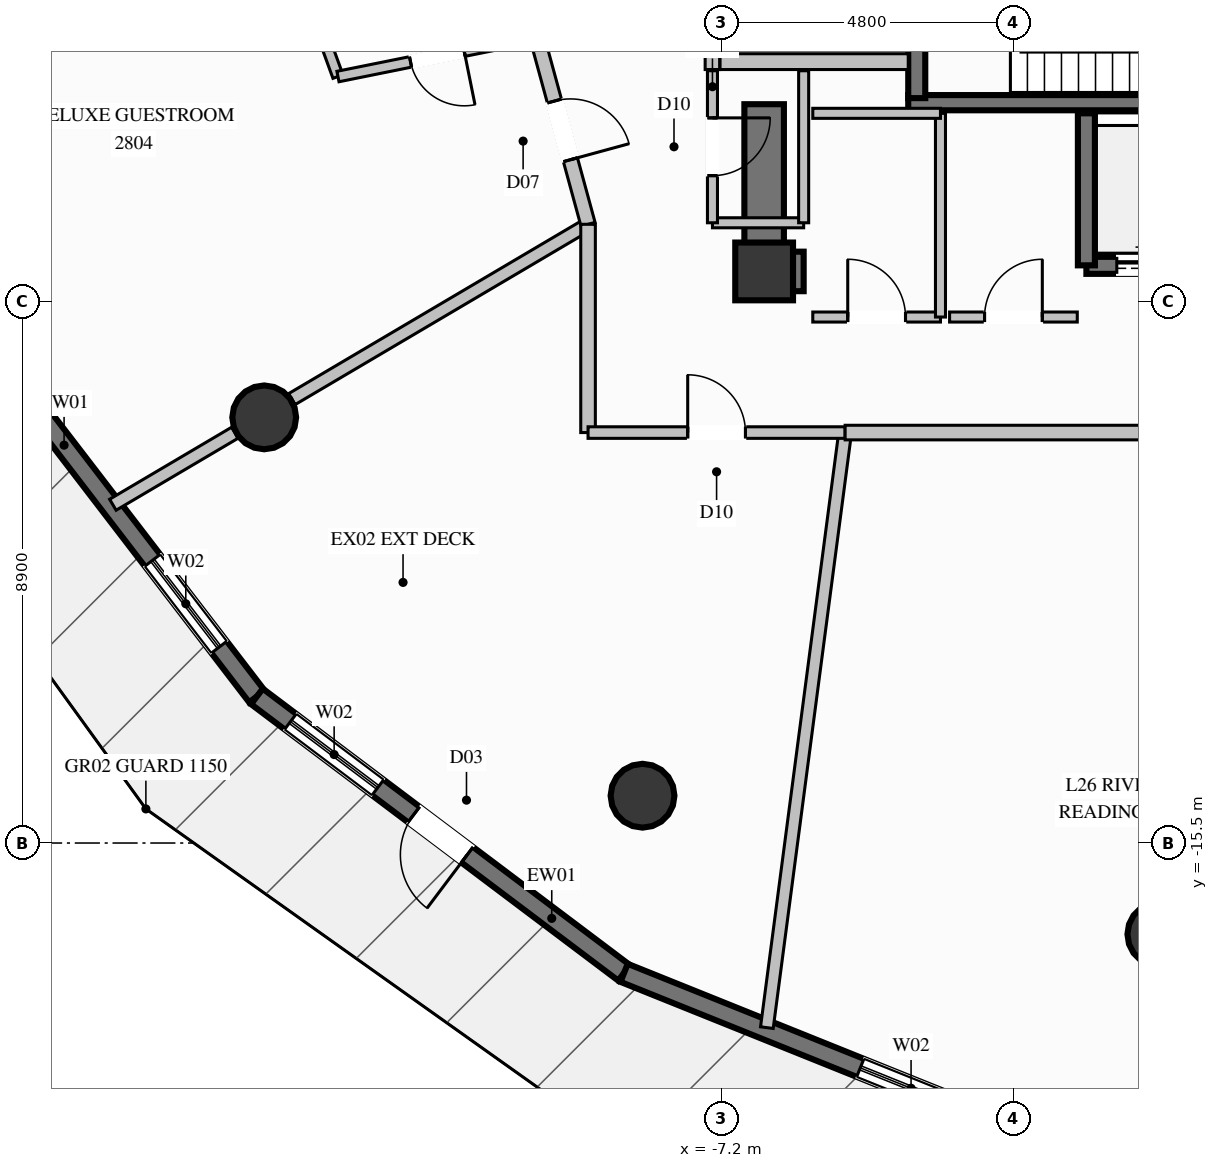
"""IFC4 building model, lengths in metres.
Left out: names, types, materials, properties, quantities, classifications, styles, units other than length and angle.
Written with IfcOpenShell. Run it as: python <this file> out.ifc"""

import sys

from ifc_helpers import new_model, si_unit, direction, frame, frame_2d, origin, origin_2d, place, context, subcontext, project, spatial, rectangle, circle, extrude, element, fill, save


model = new_model("IFC4")
c1 = context("Model", 3, precision=1e-05, world=origin(), true_north=direction((0.0, 1.0)))
c2 = subcontext(c1, "Body", "Model", "MODEL_VIEW")
j1 = project(units=[si_unit("LENGTHUNIT", "METRE"), si_unit("PLANEANGLEUNIT", "RADIAN")], contexts=[c1])
p1 = place(None, origin())
s1 = spatial("IfcSite", under=j1, at=p1, CompositionType="ELEMENT")
p2 = place(p1, origin())
s2 = spatial("IfcBuilding", under=s1, at=p2, CompositionType="ELEMENT")
p3 = place(p2, frame((0.0, 0.0, 106.2)))
s3 = spatial("IfcBuildingStorey", under=s2, at=p3, CompositionType="ELEMENT", Elevation=106.2)
p4 = place(p3, frame((-6.5, -6.1, 0.0), z_axis=(0.0, 0.0, 1.0), x_axis=(1.0, 0.0, 0.0)))
e1 = element("IfcColumn", 1, at=p4, inside=s3, PredefinedType="COLUMN", context=c2, shape_type="SweptSolid", body=[
    extrude(rectangle(XDim=0.95, YDim=0.95, at=origin_2d()), origin(), (0.0, 0.0, 1.0), 3.6),
])
p5 = place(p3, frame((-4.13, -3.325, 0.0), z_axis=(0.0, 0.0, 1.0), x_axis=(1.0, 0.0, 0.0)))
e2 = element("IfcWall", 2, at=p5, inside=s3, PredefinedType="SOLIDWALL", context=c2, shape_type="SweptSolid", body=[
    extrude(rectangle(XDim=8.26, YDim=0.25, at=frame_2d((4.13, 0.0))), origin(), (0.0, 0.0, 1.0), 3.6),
])
p6 = place(p3, frame((-6.175, -6.1, 0.0), z_axis=(0.0, 0.0, 1.0), x_axis=(1.0, 0.0, 0.0)))
e3 = element("IfcWall", 3, at=p6, inside=s3, PredefinedType="SHEAR", context=c2, shape_type="SweptSolid", body=[
    extrude(rectangle(XDim=0.325, YDim=0.65, at=frame_2d((0.163, 0.0))), origin(), (0.0, 0.0, 1.0), 3.6),
])
p7 = place(p3, frame((-6.5, -6.425, 0.0), z_axis=(0.0, 0.0, 1.0), x_axis=(0.0, 1.0, 0.0)))
e4 = element("IfcWall", 4, at=p7, inside=s3, PredefinedType="SHEAR", context=c2, shape_type="SweptSolid", body=[
    extrude(rectangle(XDim=3.075, YDim=0.65, at=frame_2d((1.538, 0.0))), origin(), (0.0, 0.0, 1.0), 3.6),
])
for number, where, z_axis, x_axis in (
    (5, (-14.722, -8.5, 0.0), (0.0, 0.0, 1.0), (1.0, 0.0, 0.0)),
    (6, (-8.5, -14.722, 0.0), (0.0, 0.0, 1.0), (1.0, 0.0, 0.0)),
    (7, (0.0, -17.0, 0.0), (0.0, 0.0, 1.0), (1.0, 0.0, 0.0)),
):
    element("IfcColumn", number, at=place(p3, frame(where, z_axis=z_axis, x_axis=x_axis)), inside=s3, PredefinedType="COLUMN", context=c2, shape_type="SweptSolid", body=[
        extrude(circle(Radius=0.525, at=origin_2d()), origin(), (0.0, 0.0, 1.0), 3.6),
    ])
p8 = place(p3, frame((-14.842, -13.089, 0.0), z_axis=(0.0, 0.0, 1.0), x_axis=(-0.608831916989, 0.793299247986, 0.0)))
e8 = element("IfcWall", 8, at=p8, inside=s3, PredefinedType="SOLIDWALL", context=c2, shape_type="SweptSolid", body=[
    extrude(rectangle(XDim=7.347, YDim=0.32, at=frame_2d((3.673, 0.0))), origin(), (0.0, 0.0, 1.0), 3.35),
])
p9 = place(p8, frame((1.021, 0.0, 0.35)))
e9 = element("IfcOpeningElement", 9, at=p9, cuts=e8, PredefinedType="OPENING", context=c2, shape_type="SweptSolid", body=[
    extrude(rectangle(XDim=1.8, YDim=2.6, at=frame_2d((0.9, 1.3))), frame((0.0, 0.17, 0.0), z_axis=(0.0, -1.0, 0.0), x_axis=(1.0, 0.0, 0.0)), (0.0, 0.0, 1.0), 0.34),
])
p10 = place(p3, frame((-8.803, -17.635, 0.0), z_axis=(0.0, 0.0, 1.0), x_axis=(-0.798944530401, 0.601404720087, 0.0)))
e10 = element("IfcWall", 10, at=p10, inside=s3, PredefinedType="SOLIDWALL", context=c2, shape_type="SweptSolid", body=[
    extrude(rectangle(XDim=7.559, YDim=0.32, at=frame_2d((3.779, 0.0))), origin(), (0.0, 0.0, 1.0), 3.35),
])
p11 = place(p10, frame((5.069, 0.0, 0.35)))
e11 = element("IfcOpeningElement", 11, at=p11, cuts=e10, PredefinedType="OPENING", context=c2, shape_type="SweptSolid", body=[
    extrude(rectangle(XDim=1.8, YDim=2.6, at=frame_2d((0.9, 1.3))), frame((0.0, 0.17, 0.0), z_axis=(0.0, -1.0, 0.0), x_axis=(1.0, 0.0, 0.0)), (0.0, 0.0, 1.0), 0.34),
])
p12 = place(p10, frame((3.229, 0.0, 0.0)))
e12 = element("IfcOpeningElement", 12, at=p12, cuts=e10, PredefinedType="OPENING", context=c2, shape_type="SweptSolid", body=[
    extrude(rectangle(XDim=1.1, YDim=2.2, at=frame_2d((0.55, 1.1))), frame((0.0, 0.17, 0.0), z_axis=(0.0, -1.0, 0.0), x_axis=(1.0, 0.0, 0.0)), (0.0, 0.0, 1.0), 0.34),
])
p13 = place(p3, frame((-1.79, -20.455, 0.0), z_axis=(0.0, 0.0, 1.0), x_axis=(-0.927795739468, 0.373088549577, 0.0)))
e13 = element("IfcWall", 13, at=p13, inside=s3, PredefinedType="SOLIDWALL", context=c2, shape_type="SweptSolid", body=[
    extrude(rectangle(XDim=7.559, YDim=0.32, at=frame_2d((3.779, 0.0))), origin(), (0.0, 0.0, 1.0), 3.35),
])
p14 = place(p13, frame((1.572, 0.0, 0.35)))
e14 = element("IfcOpeningElement", 14, at=p14, cuts=e13, PredefinedType="OPENING", context=c2, shape_type="SweptSolid", body=[
    extrude(rectangle(XDim=1.8, YDim=2.6, at=frame_2d((0.9, 1.3))), frame((0.0, 0.17, 0.0), z_axis=(0.0, -1.0, 0.0), x_axis=(1.0, 0.0, 0.0)), (0.0, 0.0, 1.0), 0.34),
])
p15 = place(p3, frame((-1.2, -6.0, 0.0), z_axis=(0.0, 0.0, 1.0), x_axis=(1.0, 0.0, 0.0)))
e15 = element("IfcWall", 15, at=p15, inside=s3, PredefinedType="SOLIDWALL", context=c2, shape_type="SweptSolid", body=[
    extrude(rectangle(XDim=2.1, YDim=0.28, at=frame_2d((1.05, 0.0))), origin(), (0.0, 0.0, 1.0), 3.35),
])
p16 = place(p15, frame((0.5, 0.0, 0.0)))
e16 = element("IfcOpeningElement", 16, at=p16, cuts=e15, PredefinedType="OPENING", context=c2, shape_type="SweptSolid", body=[
    extrude(rectangle(XDim=1.1, YDim=2.2, at=frame_2d((0.55, 1.1))), frame((0.0, 0.15, 0.0), z_axis=(0.0, -1.0, 0.0), x_axis=(1.0, 0.0, 0.0)), (0.0, 0.0, 1.0), 0.3),
])
p17 = place(p3, frame((-1.2, -3.5, 0.0), z_axis=(0.0, 0.0, 1.0), x_axis=(0.0, -1.0, 0.0)))
e17 = element("IfcWall", 17, at=p17, inside=s3, PredefinedType="SOLIDWALL", context=c2, shape_type="SweptSolid", body=[
    extrude(rectangle(XDim=2.5, YDim=0.28, at=frame_2d((1.25, 0.0))), origin(), (0.0, 0.0, 1.0), 3.35),
])
p18 = place(p3, frame((-3.99, -3.25, 0.0), z_axis=(0.0, 0.0, 1.0), x_axis=(0.0, 1.0, 0.0)))
e18 = element("IfcWall", 18, at=p18, inside=s3, PredefinedType="SOLIDWALL", context=c2, shape_type="SweptSolid", body=[
    extrude(rectangle(XDim=5.46, YDim=0.28, at=frame_2d((2.73, 0.0))), origin(), (0.0, 0.0, 1.0), 3.35),
])
p19 = place(p18, frame((0.937, 0.0, 0.0)))
e19 = element("IfcOpeningElement", 19, at=p19, cuts=e18, PredefinedType="OPENING", context=c2, shape_type="SweptSolid", body=[
    extrude(rectangle(XDim=1.2, YDim=2.2, at=frame_2d((0.6, 1.1))), frame((0.0, 0.15, 0.0), z_axis=(0.0, -1.0, 0.0), x_axis=(1.0, 0.0, 0.0)), (0.0, 0.0, 1.0), 0.3),
])
p20 = place(p3, frame((-7.35, -2.78, 0.0), z_axis=(0.0, 0.0, 1.0), x_axis=(0.0, 1.0, 0.0)))
e20 = element("IfcWall", 20, at=p20, inside=s3, PredefinedType="PARTITIONING", context=c2, shape_type="SweptSolid", body=[
    extrude(rectangle(XDim=5.12, YDim=0.24, at=frame_2d((2.56, 0.0))), origin(), (0.0, 0.0, 1.0), 2.435),
])
p21 = place(p20, frame((1.389, 0.0, 0.0)))
e21 = element("IfcOpeningElement", 21, at=p21, cuts=e20, PredefinedType="OPENING", context=c2, shape_type="SweptSolid", body=[
    extrude(rectangle(XDim=1.15, YDim=2.2, at=frame_2d((0.575, 1.1))), frame((0.0, 0.13, 0.0), z_axis=(0.0, -1.0, 0.0), x_axis=(1.0, 0.0, 0.0)), (0.0, 0.0, 1.0), 0.26),
])
p22 = place(p3, frame((-7.225, -2.65, 0.0), z_axis=(0.0, 0.0, 1.0), x_axis=(1.0, 0.0, 0.0)))
e22 = element("IfcWall", 22, at=p22, inside=s3, PredefinedType="PARTITIONING", context=c2, shape_type="SweptSolid", body=[
    extrude(rectangle(XDim=3.095, YDim=0.26, at=frame_2d((1.548, 0.0))), origin(), (0.0, 0.0, 1.0), 3.35),
])
p23 = place(p3, frame((-7.35, -5.3, 0.0), z_axis=(0.0, 0.0, 1.0), x_axis=(1.0, 0.0, 0.0)))
e23 = element("IfcWall", 23, at=p23, inside=s3, PredefinedType="PARTITIONING", context=c2, shape_type="SweptSolid", body=[
    extrude(rectangle(XDim=1.5, YDim=0.165, at=frame_2d((0.75, 0.0))), origin(), (0.0, 0.0, 1.0), 2.435),
])
p24 = place(p3, frame((-5.85, -5.3, 0.0), z_axis=(0.0, 0.0, 1.0), x_axis=(0.0, 1.0, 0.0)))
e24 = element("IfcWall", 24, at=p24, inside=s3, PredefinedType="PARTITIONING", context=c2, shape_type="SweptSolid", body=[
    extrude(rectangle(XDim=2.5, YDim=0.165, at=frame_2d((1.25, 0.0))), origin(), (0.0, 0.0, 1.0), 2.435),
])
p25 = place(p3, frame((-7.35, -2.8, 0.0), z_axis=(0.0, 0.0, 1.0), x_axis=(0.0, -1.0, 0.0)))
e25 = element("IfcWall", 25, at=p25, inside=s3, PredefinedType="PARTITIONING", context=c2, shape_type="SweptSolid", body=[
    extrude(rectangle(XDim=2.5, YDim=0.165, at=frame_2d((1.25, 0.0))), origin(), (0.0, 0.0, 1.0), 3.35),
])
p26 = place(p25, frame((0.775, 0.0, 0.0)))
e26 = element("IfcOpeningElement", 26, at=p26, cuts=e25, PredefinedType="OPENING", context=c2, shape_type="SweptSolid", body=[
    extrude(rectangle(XDim=0.95, YDim=2.1, at=frame_2d((0.475, 1.05))), frame((0.0, 0.093, 0.0), z_axis=(0.0, -1.0, 0.0), x_axis=(1.0, 0.0, 0.0)), (0.0, 0.0, 1.0), 0.185),
])
p27 = place(p3, frame((-5.7, -6.85, 0.0), z_axis=(0.0, 0.0, 1.0), x_axis=(1.0, 0.0, 0.0)))
e27 = element("IfcWall", 27, at=p27, inside=s3, PredefinedType="PARTITIONING", context=c2, shape_type="SweptSolid", body=[
    extrude(rectangle(XDim=2.1, YDim=0.165, at=frame_2d((1.05, 0.0))), origin(), (0.0, 0.0, 1.0), 2.435),
])
p28 = place(p27, frame((0.575, 0.0, 0.0)))
e28 = element("IfcOpeningElement", 28, at=p28, cuts=e27, PredefinedType="OPENING", context=c2, shape_type="SweptSolid", body=[
    extrude(rectangle(XDim=0.95, YDim=2.1, at=frame_2d((0.475, 1.05))), frame((0.0, 0.093, 0.0), z_axis=(0.0, -1.0, 0.0), x_axis=(1.0, 0.0, 0.0)), (0.0, 0.0, 1.0), 0.185),
])
p29 = place(p3, frame((-3.6, -6.85, 0.0), z_axis=(0.0, 0.0, 1.0), x_axis=(0.0, 1.0, 0.0)))
e29 = element("IfcWall", 29, at=p29, inside=s3, PredefinedType="PARTITIONING", context=c2, shape_type="SweptSolid", body=[
    extrude(rectangle(XDim=3.35, YDim=0.165, at=frame_2d((1.675, 0.0))), origin(), (0.0, 0.0, 1.0), 3.35),
])
p30 = place(p3, frame((-3.6, -3.5, 0.0), z_axis=(0.0, 0.0, 1.0), x_axis=(-1.0, 0.0, 0.0)))
e30 = element("IfcWall", 30, at=p30, inside=s3, PredefinedType="PARTITIONING", context=c2, shape_type="SweptSolid", body=[
    extrude(rectangle(XDim=2.1, YDim=0.165, at=frame_2d((1.05, 0.0))), origin(), (0.0, 0.0, 1.0), 3.35),
])
p31 = place(p3, frame((-3.45, -6.85, 0.0), z_axis=(0.0, 0.0, 1.0), x_axis=(1.0, 0.0, 0.0)))
e31 = element("IfcWall", 31, at=p31, inside=s3, PredefinedType="PARTITIONING", context=c2, shape_type="SweptSolid", body=[
    extrude(rectangle(XDim=2.1, YDim=0.165, at=frame_2d((1.05, 0.0))), origin(), (0.0, 0.0, 1.0), 2.435),
])
p32 = place(p31, frame((0.575, 0.0, 0.0)))
e32 = element("IfcOpeningElement", 32, at=p32, cuts=e31, PredefinedType="OPENING", context=c2, shape_type="SweptSolid", body=[
    extrude(rectangle(XDim=0.95, YDim=2.1, at=frame_2d((0.475, 1.05))), frame((0.0, 0.093, 0.0), z_axis=(0.0, -1.0, 0.0), x_axis=(1.0, 0.0, 0.0)), (0.0, 0.0, 1.0), 0.185),
])
p33 = place(p3, frame((-9.396, -5.325, 0.0), z_axis=(0.0, 0.0, 1.0), x_axis=(-0.861187639937, -0.508287171607, 0.0)))
e33 = element("IfcWall", 33, at=p33, inside=s3, PredefinedType="PARTITIONING", context=c2, shape_type="SweptSolid", body=[
    extrude(rectangle(XDim=5.656, YDim=0.21, at=frame_2d((2.828, 0.0))), origin(), (0.0, 0.0, 1.0), 2.719),
])
p34 = place(p3, frame((-15.205, -8.753, 0.0), z_axis=(0.0, 0.0, 1.0), x_axis=(-0.861151801863, -0.508347886932, 0.0)))
e34 = element("IfcWall", 34, at=p34, inside=s3, PredefinedType="PARTITIONING", context=c2, shape_type="SweptSolid", body=[
    extrude(rectangle(XDim=2.329, YDim=0.21, at=frame_2d((1.165, 0.0))), origin(), (0.0, 0.0, 1.0), 3.35),
])
p35 = place(p3, frame((-14.563, 0.0, 0.0), z_axis=(0.0, 0.0, 1.0), x_axis=(0.342092982083, -0.939666106449, 0.0)))
e35 = element("IfcWall", 35, at=p35, inside=s3, PredefinedType="PLUMBINGWALL", context=c2, shape_type="SweptSolid", body=[
    extrude(rectangle(XDim=3.081, YDim=0.175, at=frame_2d((1.541, 0.0))), origin(), (0.0, 0.0, 1.0), 3.35),
])
p36 = place(p3, frame((-10.239, -2.236, 0.0), z_axis=(0.0, 0.0, 1.0), x_axis=(-0.980295333609, -0.197537487338, 0.0)))
e36 = element("IfcWall", 36, at=p36, inside=s3, PredefinedType="PLUMBINGWALL", context=c2, shape_type="SweptSolid", body=[
    extrude(rectangle(XDim=3.336, YDim=0.175, at=frame_2d((1.668, 0.0))), origin(), (0.0, 0.0, 1.0), 3.35),
])
p37 = place(p36, frame((1.218, 0.0, 0.0)))
e37 = element("IfcOpeningElement", 37, at=p37, cuts=e36, PredefinedType="OPENING", context=c2, shape_type="SweptSolid", body=[
    extrude(rectangle(XDim=0.9, YDim=2.1, at=frame_2d((0.45, 1.05))), frame((0.0, 0.098, 0.0), z_axis=(0.0, -1.0, 0.0), x_axis=(1.0, 0.0, 0.0)), (0.0, 0.0, 1.0), 0.195),
])
p38 = place(p3, frame((-10.239, -2.236, 0.0), z_axis=(0.0, 0.0, 1.0), x_axis=(0.26329160366, -0.964716295831, 0.0)))
e38 = element("IfcWall", 38, at=p38, inside=s3, PredefinedType="PARTITIONING", context=c2, shape_type="SweptSolid", body=[
    extrude(rectangle(XDim=3.202, YDim=0.24, at=frame_2d((1.601, 0.0))), origin(), (0.0, 0.0, 1.0), 3.35),
])
p39 = place(p38, frame((1.101, 0.0, 0.0)))
e39 = element("IfcOpeningElement", 39, at=p39, cuts=e38, PredefinedType="OPENING", context=c2, shape_type="SweptSolid", body=[
    extrude(rectangle(XDim=1.0, YDim=2.2, at=frame_2d((0.5, 1.1))), frame((0.0, 0.13, 0.0), z_axis=(0.0, -1.0, 0.0), x_axis=(1.0, 0.0, 0.0)), (0.0, 0.0, 1.0), 0.26),
])
p40 = place(p3, frame((-5.168, -8.75, 0.0), z_axis=(0.0, 0.0, 1.0), x_axis=(-0.130403964366, -0.991460945311, 0.0)))
e40 = element("IfcWall", 40, at=p40, inside=s3, PredefinedType="PARTITIONING", context=c2, shape_type="SweptSolid", body=[
    extrude(rectangle(XDim=9.87, YDim=0.21, at=frame_2d((4.935, 0.0))), origin(), (0.0, 0.0, 1.0), 3.35),
])
p41 = place(p3, frame((-9.396, -5.325, 0.0), z_axis=(0.0, 0.0, 1.0), x_axis=(0.0, -1.0, 0.0)))
e41 = element("IfcWall", 41, at=p41, inside=s3, PredefinedType="PARTITIONING", context=c2, shape_type="SweptSolid", body=[
    extrude(rectangle(XDim=3.425, YDim=0.24, at=frame_2d((1.712, 0.0))), origin(), (0.0, 0.0, 1.0), 3.35),
])
p42 = place(p3, frame((-9.396, -8.75, 0.0), z_axis=(0.0, 0.0, 1.0), x_axis=(1.0, 0.0, 0.0)))
e42 = element("IfcWall", 42, at=p42, inside=s3, PredefinedType="PARTITIONING", context=c2, shape_type="SweptSolid", body=[
    extrude(rectangle(XDim=4.228, YDim=0.19, at=frame_2d((2.114, 0.0))), origin(), (0.0, 0.0, 1.0), 3.35),
])
p43 = place(p42, frame((1.639, 0.0, 0.0)))
e43 = element("IfcOpeningElement", 43, at=p43, cuts=e42, PredefinedType="OPENING", context=c2, shape_type="SweptSolid", body=[
    extrude(rectangle(XDim=0.95, YDim=2.1, at=frame_2d((0.475, 1.05))), frame((0.0, 0.105, 0.0), z_axis=(0.0, -1.0, 0.0), x_axis=(1.0, 0.0, 0.0)), (0.0, 0.0, 1.0), 0.21),
])
p44 = place(p3, frame((-5.168, -8.75, 0.0), z_axis=(0.0, 0.0, 1.0), x_axis=(1.0, 0.0, 0.0)))
e44 = element("IfcWall", 44, at=p44, inside=s3, PredefinedType="PARTITIONING", context=c2, shape_type="SweptSolid", body=[
    extrude(rectangle(XDim=5.168, YDim=0.24, at=frame_2d((2.584, 0.0))), origin(), (0.0, 0.0, 1.0), 3.35),
])
p45 = place(p9, origin())
e45 = element("IfcWindow", 45, at=p45, inside=s3, PartitioningType="SINGLE_PANEL", PredefinedType="WINDOW", context=c2, shape_type="SweptSolid", body=[
    extrude(rectangle(XDim=1.8, YDim=2.6, at=frame_2d((0.9, 1.3))), frame((0.0, 0.03, 0.0), z_axis=(0.0, -1.0, 0.0), x_axis=(1.0, 0.0, 0.0)), (0.0, 0.0, 1.0), 0.06),
])
fill(e9, e45)
p46 = place(p11, origin())
e46 = element("IfcWindow", 46, at=p46, inside=s3, PartitioningType="SINGLE_PANEL", PredefinedType="WINDOW", context=c2, shape_type="SweptSolid", body=[
    extrude(rectangle(XDim=1.8, YDim=2.6, at=frame_2d((0.9, 1.3))), frame((0.0, 0.03, 0.0), z_axis=(0.0, -1.0, 0.0), x_axis=(1.0, 0.0, 0.0)), (0.0, 0.0, 1.0), 0.06),
])
fill(e11, e46)
p47 = place(p12, origin())
e47 = element("IfcDoor", 47, at=p47, inside=s3, OperationType="SINGLE_SWING_LEFT", PredefinedType="DOOR", context=c2, shape_type="SweptSolid", body=[
    extrude(rectangle(XDim=1.1, YDim=2.2, at=frame_2d((0.55, 1.1))), frame((0.0, 0.025, 0.0), z_axis=(0.0, -1.0, 0.0), x_axis=(1.0, 0.0, 0.0)), (0.0, 0.0, 1.0), 0.05),
])
fill(e12, e47)
p48 = place(p14, origin())
e48 = element("IfcWindow", 48, at=p48, inside=s3, PartitioningType="SINGLE_PANEL", PredefinedType="WINDOW", context=c2, shape_type="SweptSolid", body=[
    extrude(rectangle(XDim=1.8, YDim=2.6, at=frame_2d((0.9, 1.3))), frame((0.0, 0.03, 0.0), z_axis=(0.0, -1.0, 0.0), x_axis=(1.0, 0.0, 0.0)), (0.0, 0.0, 1.0), 0.06),
])
fill(e14, e48)
p49 = place(p16, origin())
e49 = element("IfcDoor", 49, at=p49, inside=s3, OperationType="SLIDING_TO_LEFT", PredefinedType="DOOR", context=c2, shape_type="SweptSolid", body=[
    extrude(rectangle(XDim=1.1, YDim=2.2, at=frame_2d((0.55, 1.1))), frame((0.0, 0.025, 0.0), z_axis=(0.0, -1.0, 0.0), x_axis=(1.0, 0.0, 0.0)), (0.0, 0.0, 1.0), 0.05),
])
fill(e16, e49)
p50 = place(p26, origin())
e50 = element("IfcDoor", 50, at=p50, inside=s3, OperationType="SINGLE_SWING_LEFT", PredefinedType="DOOR", context=c2, shape_type="SweptSolid", body=[
    extrude(rectangle(XDim=0.95, YDim=2.1, at=frame_2d((0.475, 1.05))), frame((0.0, 0.025, 0.0), z_axis=(0.0, -1.0, 0.0), x_axis=(1.0, 0.0, 0.0)), (0.0, 0.0, 1.0), 0.05),
])
fill(e26, e50)
p51 = place(p28, origin())
e51 = element("IfcDoor", 51, at=p51, inside=s3, OperationType="SINGLE_SWING_LEFT", PredefinedType="DOOR", context=c2, shape_type="SweptSolid", body=[
    extrude(rectangle(XDim=0.95, YDim=2.1, at=frame_2d((0.475, 1.05))), frame((0.0, 0.025, 0.0), z_axis=(0.0, -1.0, 0.0), x_axis=(1.0, 0.0, 0.0)), (0.0, 0.0, 1.0), 0.05),
])
fill(e28, e51)
p52 = place(p32, origin())
e52 = element("IfcDoor", 52, at=p52, inside=s3, OperationType="SINGLE_SWING_RIGHT", PredefinedType="DOOR", context=c2, shape_type="SweptSolid", body=[
    extrude(rectangle(XDim=0.95, YDim=2.1, at=frame_2d((0.475, 1.05))), frame((0.0, 0.025, 0.0), z_axis=(0.0, -1.0, 0.0), x_axis=(1.0, 0.0, 0.0)), (0.0, 0.0, 1.0), 0.05),
])
fill(e32, e52)
p53 = place(p37, origin())
e53 = element("IfcDoor", 53, at=p53, inside=s3, OperationType="SINGLE_SWING_LEFT", PredefinedType="DOOR", context=c2, shape_type="SweptSolid", body=[
    extrude(rectangle(XDim=0.9, YDim=2.1, at=frame_2d((0.45, 1.05))), frame((0.0, 0.025, 0.0), z_axis=(0.0, -1.0, 0.0), x_axis=(1.0, 0.0, 0.0)), (0.0, 0.0, 1.0), 0.05),
])
fill(e37, e53)
p54 = place(p39, origin())
e54 = element("IfcDoor", 54, at=p54, inside=s3, OperationType="SINGLE_SWING_RIGHT", PredefinedType="DOOR", context=c2, shape_type="SweptSolid", body=[
    extrude(rectangle(XDim=1.0, YDim=2.2, at=frame_2d((0.5, 1.1))), frame((0.0, 0.025, 0.0), z_axis=(0.0, -1.0, 0.0), x_axis=(1.0, 0.0, 0.0)), (0.0, 0.0, 1.0), 0.05),
])
fill(e39, e54)
p55 = place(p43, origin())
e55 = element("IfcDoor", 55, at=p55, inside=s3, OperationType="SINGLE_SWING_LEFT", PredefinedType="DOOR", context=c2, shape_type="SweptSolid", body=[
    extrude(rectangle(XDim=0.95, YDim=2.1, at=frame_2d((0.475, 1.05))), frame((0.0, 0.025, 0.0), z_axis=(0.0, -1.0, 0.0), x_axis=(1.0, 0.0, 0.0)), (0.0, 0.0, 1.0), 0.05),
])
fill(e43, e55)
save(model, sys.argv[1])
